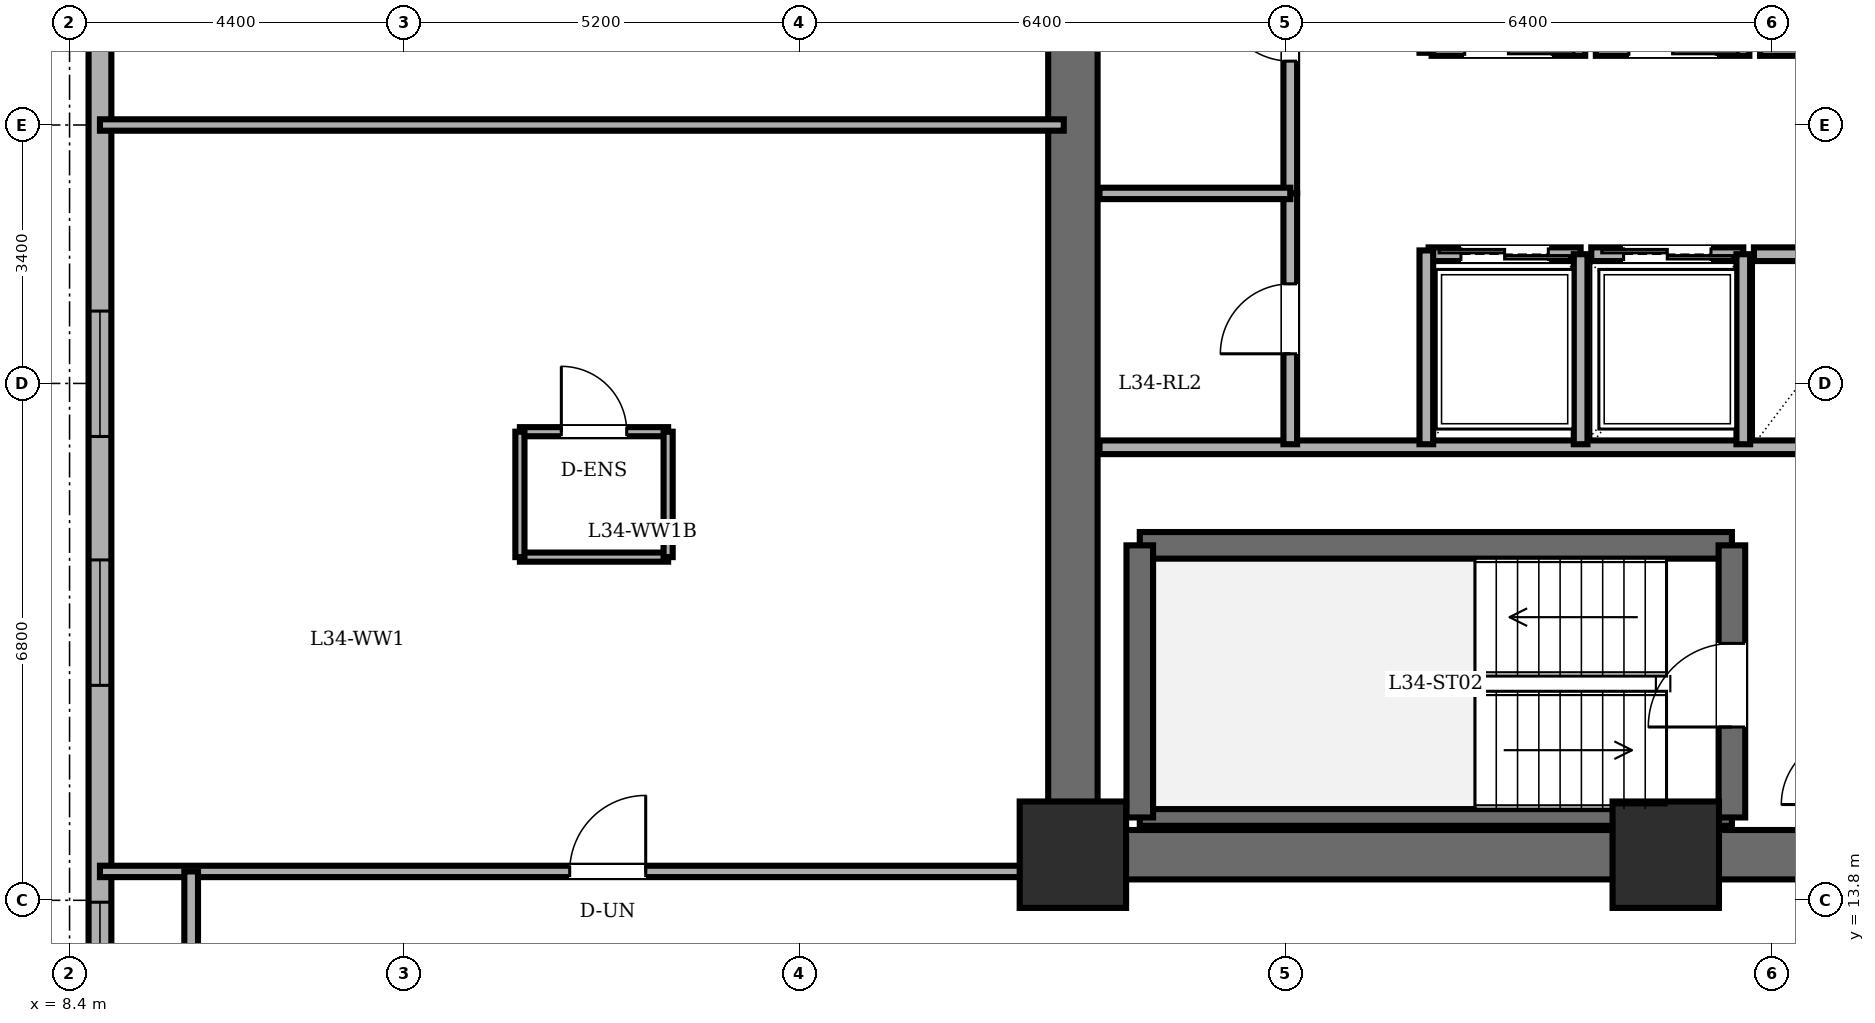
"""IFC4 building model, lengths in metres.
Left out: names, types, materials, properties, quantities, classifications, styles, units other than length and angle.
Written with IfcOpenShell. Run it as: python <this file> out.ifc"""

import sys

from ifc_helpers import new_model, si_unit, direction, frame, frame_2d, origin, origin_2d, place, context, subcontext, project, spatial, rectangle, extrude, element, fill, save


model = new_model("IFC4")
c1 = context("Model", 3, precision=1e-05, world=origin(), true_north=direction((0.0, 1.0)))
c2 = subcontext(c1, "Body", "Model", "MODEL_VIEW")
j1 = project(units=[si_unit("LENGTHUNIT", "METRE"), si_unit("PLANEANGLEUNIT", "RADIAN")], contexts=[c1])
p1 = place(None, origin())
s1 = spatial("IfcSite", under=j1, at=p1, CompositionType="ELEMENT")
p2 = place(p1, origin())
s2 = spatial("IfcBuilding", under=s1, at=p2, CompositionType="ELEMENT")
p3 = place(p2, frame((0.0, 0.0, 129.5)))
s3 = spatial("IfcBuildingStorey", under=s2, at=p3, CompositionType="ELEMENT", Elevation=129.5)
for number, where, z_axis, x_axis in (
    (1, (21.6, 14.4, 0.0), (0.0, 0.0, 1.0), (1.0, 0.0, 0.0)),
    (2, (29.4, 14.4, 0.0), (0.0, 0.0, 1.0), (1.0, 0.0, 0.0)),
):
    element("IfcColumn", number, at=place(p3, frame(where, z_axis=z_axis, x_axis=x_axis)), inside=s3, PredefinedType="COLUMN", context=c2, shape_type="SweptSolid", body=[
        extrude(rectangle(XDim=1.4, YDim=1.4, at=origin_2d()), origin(), (0.0, 0.0, 1.0), 3.6),
    ])
p4 = place(p3, frame((8.8, 38.2, 0.0), z_axis=(0.0, 0.0, 1.0), x_axis=(0.0, -1.0, 0.0)))
e3 = element("IfcWall", 3, at=p4, inside=s3, PredefinedType="SOLIDWALL", context=c2, shape_type="SweptSolid", body=[
    extrude(rectangle(XDim=28.4, YDim=0.3, at=frame_2d((14.2, 0.0))), origin(), (0.0, 0.0, 1.0), 3.36),
])
p5 = place(p4, frame((2.325, 0.0, 0.85)))
e4 = element("IfcOpeningElement", 4, at=p5, cuts=e3, PredefinedType="OPENING", context=c2, shape_type="SweptSolid", body=[
    extrude(rectangle(XDim=1.65, YDim=1.55, at=frame_2d((0.825, 0.775))), frame((0.0, 0.16, 0.0), z_axis=(0.0, -1.0, 0.0), x_axis=(1.0, 0.0, 0.0)), (0.0, 0.0, 1.0), 0.32),
])
p6 = place(p4, frame((6.828, 0.0, 0.85)))
e5 = element("IfcOpeningElement", 5, at=p6, cuts=e3, PredefinedType="OPENING", context=c2, shape_type="SweptSolid", body=[
    extrude(rectangle(XDim=1.65, YDim=1.55, at=frame_2d((0.825, 0.775))), frame((0.0, 0.16, 0.0), z_axis=(0.0, -1.0, 0.0), x_axis=(1.0, 0.0, 0.0)), (0.0, 0.0, 1.0), 0.32),
])
p7 = place(p4, frame((10.102, 0.0, 0.85)))
e6 = element("IfcOpeningElement", 6, at=p7, cuts=e3, PredefinedType="OPENING", context=c2, shape_type="SweptSolid", body=[
    extrude(rectangle(XDim=1.65, YDim=1.55, at=frame_2d((0.825, 0.775))), frame((0.0, 0.16, 0.0), z_axis=(0.0, -1.0, 0.0), x_axis=(1.0, 0.0, 0.0)), (0.0, 0.0, 1.0), 0.32),
])
p8 = place(p4, frame((16.648, 0.0, 0.85)))
e7 = element("IfcOpeningElement", 7, at=p8, cuts=e3, PredefinedType="OPENING", context=c2, shape_type="SweptSolid", body=[
    extrude(rectangle(XDim=1.65, YDim=1.55, at=frame_2d((0.825, 0.775))), frame((0.0, 0.16, 0.0), z_axis=(0.0, -1.0, 0.0), x_axis=(1.0, 0.0, 0.0)), (0.0, 0.0, 1.0), 0.32),
])
p9 = place(p4, frame((19.922, 0.0, 0.85)))
e8 = element("IfcOpeningElement", 8, at=p9, cuts=e3, PredefinedType="OPENING", context=c2, shape_type="SweptSolid", body=[
    extrude(rectangle(XDim=1.65, YDim=1.55, at=frame_2d((0.825, 0.775))), frame((0.0, 0.16, 0.0), z_axis=(0.0, -1.0, 0.0), x_axis=(1.0, 0.0, 0.0)), (0.0, 0.0, 1.0), 0.32),
])
p10 = place(p4, frame((24.425, 0.0, 0.85)))
e9 = element("IfcOpeningElement", 9, at=p10, cuts=e3, PredefinedType="OPENING", context=c2, shape_type="SweptSolid", body=[
    extrude(rectangle(XDim=1.65, YDim=1.55, at=frame_2d((0.825, 0.775))), frame((0.0, 0.16, 0.0), z_axis=(0.0, -1.0, 0.0), x_axis=(1.0, 0.0, 0.0)), (0.0, 0.0, 1.0), 0.32),
])
p11 = place(p3, frame((21.6, 14.4, 0.0), z_axis=(0.0, 0.0, 1.0), x_axis=(0.0, 1.0, 0.0)))
e10 = element("IfcWall", 10, at=p11, inside=s3, PredefinedType="SHEAR", context=c2, shape_type="SweptSolid", body=[
    extrude(rectangle(XDim=19.2, YDim=0.65, at=frame_2d((9.6, 0.0))), origin(), (0.0, 0.0, 1.0), 3.36),
])
p12 = place(p3, frame((37.2, 14.4, 0.0), z_axis=(0.0, 0.0, 1.0), x_axis=(-1.0, 0.0, 0.0)))
e11 = element("IfcWall", 11, at=p12, inside=s3, PredefinedType="SHEAR", context=c2, shape_type="SweptSolid", body=[
    extrude(rectangle(XDim=15.6, YDim=0.65, at=frame_2d((7.8, 0.0))), origin(), (0.0, 0.0, 1.0), 3.36),
])
p13 = place(p3, frame((22.48, 18.47, 0.0), z_axis=(0.0, 0.0, 1.0), x_axis=(1.0, 0.0, 0.0)))
e12 = element("IfcWall", 12, at=p13, inside=s3, PredefinedType="SOLIDWALL", context=c2, shape_type="SweptSolid", body=[
    extrude(rectangle(XDim=7.79, YDim=0.35, at=frame_2d((3.895, 0.0))), origin(), (0.0, 0.0, 1.0), 3.36),
])
p14 = place(p3, frame((22.48, 14.89, 0.0), z_axis=(0.0, 0.0, 1.0), x_axis=(1.0, 0.0, 0.0)))
e13 = element("IfcWall", 13, at=p14, inside=s3, PredefinedType="PARTITIONING", context=c2, shape_type="SweptSolid", body=[
    extrude(rectangle(XDim=7.79, YDim=0.22, at=frame_2d((3.895, 0.0))), origin(), (0.0, 0.0, 1.0), 3.36),
])
p15 = place(p3, frame((22.48, 14.89, 0.0), z_axis=(0.0, 0.0, 1.0), x_axis=(0.0, 1.0, 0.0)))
e14 = element("IfcWall", 14, at=p15, inside=s3, PredefinedType="SOLIDWALL", context=c2, shape_type="SweptSolid", body=[
    extrude(rectangle(XDim=3.58, YDim=0.35, at=frame_2d((1.79, 0.0))), origin(), (0.0, 0.0, 1.0), 3.36),
])
p16 = place(p3, frame((30.27, 14.89, 0.0), z_axis=(0.0, 0.0, 1.0), x_axis=(0.0, 1.0, 0.0)))
e15 = element("IfcWall", 15, at=p16, inside=s3, PredefinedType="SOLIDWALL", context=c2, shape_type="SweptSolid", body=[
    extrude(rectangle(XDim=3.58, YDim=0.35, at=frame_2d((1.79, 0.0))), origin(), (0.0, 0.0, 1.0), 3.36),
])
p17 = place(p16, frame((1.19, 0.0, 0.0)))
e16 = element("IfcOpeningElement", 16, at=p17, cuts=e15, PredefinedType="OPENING", context=c2, shape_type="SweptSolid", body=[
    extrude(rectangle(XDim=1.1, YDim=2.15, at=frame_2d((0.55, 1.075))), frame((0.0, 0.185, 0.0), z_axis=(0.0, -1.0, 0.0), x_axis=(1.0, 0.0, 0.0)), (0.0, 0.0, 1.0), 0.37),
])
p18 = place(p3, frame((21.95, 19.76, 0.0), z_axis=(0.0, 0.0, 1.0), x_axis=(1.0, 0.0, 0.0)))
e17 = element("IfcWall", 17, at=p18, inside=s3, PredefinedType="PARTITIONING", context=c2, shape_type="SweptSolid", body=[
    extrude(rectangle(XDim=14.87, YDim=0.18, at=frame_2d((7.435, 0.0))), origin(), (0.0, 0.0, 1.0), 3.36),
])
p19 = place(p3, frame((28.34, 25.0, 0.0), z_axis=(0.0, 0.0, 1.0), x_axis=(-1.0, 0.0, 0.0)))
e18 = element("IfcWall", 18, at=p19, inside=s3, PredefinedType="PARTITIONING", context=c2, shape_type="SweptSolid", body=[
    extrude(rectangle(XDim=2.02, YDim=0.18, at=frame_2d((1.01, 0.0))), origin(), (0.0, 0.0, 1.0), 3.36),
])
p20 = place(p19, frame((0.435, 0.0, 0.0)))
e19 = element("IfcOpeningElement", 19, at=p20, cuts=e18, PredefinedType="OPENING", context=c2, shape_type="SweptSolid", body=[
    extrude(rectangle(XDim=1.15, YDim=2.2, at=frame_2d((0.575, 1.1))), frame((0.0, 0.1, 0.0), z_axis=(0.0, -1.0, 0.0), x_axis=(1.0, 0.0, 0.0)), (0.0, 0.0, 1.0), 0.2),
])
p21 = place(p3, frame((30.5, 25.0, 0.0), z_axis=(0.0, 0.0, 1.0), x_axis=(-1.0, 0.0, 0.0)))
e20 = element("IfcWall", 20, at=p21, inside=s3, PredefinedType="PARTITIONING", context=c2, shape_type="SweptSolid", body=[
    extrude(rectangle(XDim=2.02, YDim=0.18, at=frame_2d((1.01, 0.0))), origin(), (0.0, 0.0, 1.0), 3.36),
])
p22 = place(p21, frame((0.435, 0.0, 0.0)))
e21 = element("IfcOpeningElement", 21, at=p22, cuts=e20, PredefinedType="OPENING", context=c2, shape_type="SweptSolid", body=[
    extrude(rectangle(XDim=1.15, YDim=2.2, at=frame_2d((0.575, 1.1))), frame((0.0, 0.1, 0.0), z_axis=(0.0, -1.0, 0.0), x_axis=(1.0, 0.0, 0.0)), (0.0, 0.0, 1.0), 0.2),
])
p23 = place(p3, frame((26.28, 22.3, 0.0), z_axis=(0.0, 0.0, 1.0), x_axis=(1.0, 0.0, 0.0)))
e22 = element("IfcWall", 22, at=p23, inside=s3, PredefinedType="PARTITIONING", context=c2, shape_type="SweptSolid", body=[
    extrude(rectangle(XDim=2.0, YDim=0.18, at=frame_2d((1.0, 0.0))), origin(), (0.0, 0.0, 1.0), 3.36),
])
p24 = place(p23, frame((0.425, 0.0, 0.0)))
e23 = element("IfcOpeningElement", 23, at=p24, cuts=e22, PredefinedType="OPENING", context=c2, shape_type="SweptSolid", body=[
    extrude(rectangle(XDim=1.15, YDim=2.2, at=frame_2d((0.575, 1.1))), frame((0.0, 0.1, 0.0), z_axis=(0.0, -1.0, 0.0), x_axis=(1.0, 0.0, 0.0)), (0.0, 0.0, 1.0), 0.2),
])
p25 = place(p3, frame((28.28, 19.8, 0.0), z_axis=(0.0, 0.0, 1.0), x_axis=(0.0, 1.0, 0.0)))
e24 = element("IfcWall", 24, at=p25, inside=s3, PredefinedType="PARTITIONING", context=c2, shape_type="SweptSolid", body=[
    extrude(rectangle(XDim=2.5, YDim=0.18, at=frame_2d((1.25, 0.0))), origin(), (0.0, 0.0, 1.0), 3.36),
])
p26 = place(p3, frame((28.42, 22.3, 0.0), z_axis=(0.0, 0.0, 1.0), x_axis=(1.0, 0.0, 0.0)))
e25 = element("IfcWall", 25, at=p26, inside=s3, PredefinedType="PARTITIONING", context=c2, shape_type="SweptSolid", body=[
    extrude(rectangle(XDim=2.0, YDim=0.18, at=frame_2d((1.0, 0.0))), origin(), (0.0, 0.0, 1.0), 3.36),
])
p27 = place(p26, frame((0.425, 0.0, 0.0)))
e26 = element("IfcOpeningElement", 26, at=p27, cuts=e25, PredefinedType="OPENING", context=c2, shape_type="SweptSolid", body=[
    extrude(rectangle(XDim=1.15, YDim=2.2, at=frame_2d((0.575, 1.1))), frame((0.0, 0.1, 0.0), z_axis=(0.0, -1.0, 0.0), x_axis=(1.0, 0.0, 0.0)), (0.0, 0.0, 1.0), 0.2),
])
p28 = place(p3, frame((30.42, 19.8, 0.0), z_axis=(0.0, 0.0, 1.0), x_axis=(0.0, 1.0, 0.0)))
e27 = element("IfcWall", 27, at=p28, inside=s3, PredefinedType="PARTITIONING", context=c2, shape_type="SweptSolid", body=[
    extrude(rectangle(XDim=2.5, YDim=0.18, at=frame_2d((1.25, 0.0))), origin(), (0.0, 0.0, 1.0), 3.36),
])
p29 = place(p3, frame((32.46, 25.0, 0.0), z_axis=(0.0, 0.0, 1.0), x_axis=(-1.0, 0.0, 0.0)))
e28 = element("IfcWall", 28, at=p29, inside=s3, PredefinedType="PARTITIONING", context=c2, shape_type="SweptSolid", body=[
    extrude(rectangle(XDim=1.82, YDim=0.18, at=frame_2d((0.91, 0.0))), origin(), (0.0, 0.0, 1.0), 3.36),
])
p30 = place(p3, frame((30.56, 22.3, 0.0), z_axis=(0.0, 0.0, 1.0), x_axis=(1.0, 0.0, 0.0)))
e29 = element("IfcWall", 29, at=p30, inside=s3, PredefinedType="PARTITIONING", context=c2, shape_type="SweptSolid", body=[
    extrude(rectangle(XDim=1.9, YDim=0.18, at=frame_2d((0.95, 0.0))), origin(), (0.0, 0.0, 1.0), 3.36),
])
p31 = place(p3, frame((24.46, 23.1, 0.0), z_axis=(0.0, 0.0, 1.0), x_axis=(0.0, 1.0, 0.0)))
e30 = element("IfcWall", 30, at=p31, inside=s3, PredefinedType="PARTITIONING", context=c2, shape_type="SweptSolid", body=[
    extrude(rectangle(XDim=4.4, YDim=0.18, at=frame_2d((2.2, 0.0))), origin(), (0.0, 0.0, 1.0), 3.36),
])
p32 = place(p31, frame((1.74, 0.0, 0.0)))
e31 = element("IfcOpeningElement", 31, at=p32, cuts=e30, PredefinedType="OPENING", context=c2, shape_type="SweptSolid", body=[
    extrude(rectangle(XDim=0.92, YDim=2.1, at=frame_2d((0.46, 1.05))), frame((0.0, 0.1, 0.0), z_axis=(0.0, -1.0, 0.0), x_axis=(1.0, 0.0, 0.0)), (0.0, 0.0, 1.0), 0.2),
])
p33 = place(p3, frame((24.46, 19.8, 0.0), z_axis=(0.0, 0.0, 1.0), x_axis=(0.0, 1.0, 0.0)))
e32 = element("IfcWall", 32, at=p33, inside=s3, PredefinedType="PARTITIONING", context=c2, shape_type="SweptSolid", body=[
    extrude(rectangle(XDim=3.3, YDim=0.18, at=frame_2d((1.65, 0.0))), origin(), (0.0, 0.0, 1.0), 3.36),
])
p34 = place(p33, frame((1.19, 0.0, 0.0)))
e33 = element("IfcOpeningElement", 33, at=p34, cuts=e32, PredefinedType="OPENING", context=c2, shape_type="SweptSolid", body=[
    extrude(rectangle(XDim=0.92, YDim=2.1, at=frame_2d((0.46, 1.05))), frame((0.0, 0.1, 0.0), z_axis=(0.0, -1.0, 0.0), x_axis=(1.0, 0.0, 0.0)), (0.0, 0.0, 1.0), 0.2),
])
p35 = place(p3, frame((21.95, 23.1, 0.0), z_axis=(0.0, 0.0, 1.0), x_axis=(1.0, 0.0, 0.0)))
e34 = element("IfcWall", 34, at=p35, inside=s3, PredefinedType="PARTITIONING", context=c2, shape_type="SweptSolid", body=[
    extrude(rectangle(XDim=2.51, YDim=0.15, at=frame_2d((1.255, 0.0))), origin(), (0.0, 0.0, 1.0), 3.36),
])
for number, where, z_axis, x_axis in (
    (35, (26.25, 24.95, 0.0), (0.0, 0.0, 1.0), (0.0, 1.0, 0.0)),
    (36, (26.25, 19.8, 0.0), (0.0, 0.0, 1.0), (0.0, 1.0, 0.0)),
):
    element("IfcWall", number, at=place(p3, frame(where, z_axis=z_axis, x_axis=x_axis)), inside=s3, PredefinedType="PARTITIONING", context=c2, shape_type="SweptSolid", body=[
        extrude(rectangle(XDim=2.55, YDim=0.18, at=frame_2d((1.275, 0.0))), origin(), (0.0, 0.0, 1.0), 3.36),
    ])
p36 = place(p3, frame((14.325, 19.965, 0.0), z_axis=(0.0, 0.0, 1.0), x_axis=(1.0, 0.0, 0.0)))
e37 = element("IfcWall", 37, at=p36, inside=s3, PredefinedType="PARTITIONING", context=c2, shape_type="SweptSolid", body=[
    extrude(rectangle(XDim=1.95, YDim=0.12, at=frame_2d((0.975, 0.0))), origin(), (0.0, 0.0, 1.0), 3.36),
])
p37 = place(p36, frame((0.545, 0.0, 0.0)))
e38 = element("IfcOpeningElement", 38, at=p37, cuts=e37, PredefinedType="OPENING", context=c2, shape_type="SweptSolid", body=[
    extrude(rectangle(XDim=0.86, YDim=2.1, at=frame_2d((0.43, 1.05))), frame((0.0, 0.07, 0.0), z_axis=(0.0, -1.0, 0.0), x_axis=(1.0, 0.0, 0.0)), (0.0, 0.0, 1.0), 0.14),
])
p38 = place(p3, frame((16.275, 18.315, 0.0), z_axis=(0.0, 0.0, 1.0), x_axis=(-1.0, 0.0, 0.0)))
e39 = element("IfcWall", 39, at=p38, inside=s3, PredefinedType="PARTITIONING", context=c2, shape_type="SweptSolid", body=[
    extrude(rectangle(XDim=1.95, YDim=0.12, at=frame_2d((0.975, 0.0))), origin(), (0.0, 0.0, 1.0), 3.36),
])
for number, where, z_axis, x_axis in (
    (40, (14.325, 19.965, 0.0), (0.0, 0.0, 1.0), (0.0, -1.0, 0.0)),
    (41, (16.275, 18.315, 0.0), (0.0, 0.0, 1.0), (0.0, 1.0, 0.0)),
):
    element("IfcWall", number, at=place(p3, frame(where, z_axis=z_axis, x_axis=x_axis)), inside=s3, PredefinedType="PARTITIONING", context=c2, shape_type="SweptSolid", body=[
        extrude(rectangle(XDim=1.65, YDim=0.12, at=frame_2d((0.825, 0.0))), origin(), (0.0, 0.0, 1.0), 3.36),
    ])
p39 = place(p3, frame((8.8, 14.18, 0.0), z_axis=(0.0, 0.0, 1.0), x_axis=(1.0, 0.0, 0.0)))
e42 = element("IfcWall", 42, at=p39, inside=s3, PredefinedType="PARTITIONING", context=c2, shape_type="SweptSolid", body=[
    extrude(rectangle(XDim=12.68, YDim=0.15, at=frame_2d((6.34, 0.0))), origin(), (0.0, 0.0, 1.0), 3.36),
])
p40 = place(p39, frame((6.18, 0.0, 0.0)))
e43 = element("IfcOpeningElement", 43, at=p40, cuts=e42, PredefinedType="OPENING", context=c2, shape_type="SweptSolid", body=[
    extrude(rectangle(XDim=1.0, YDim=2.15, at=frame_2d((0.5, 1.075))), frame((0.0, 0.085, 0.0), z_axis=(0.0, -1.0, 0.0), x_axis=(1.0, 0.0, 0.0)), (0.0, 0.0, 1.0), 0.17),
])
p41 = place(p3, frame((8.8, 24.0, 0.0), z_axis=(0.0, 0.0, 1.0), x_axis=(1.0, 0.0, 0.0)))
e44 = element("IfcWall", 44, at=p41, inside=s3, PredefinedType="PARTITIONING", context=c2, shape_type="SweptSolid", body=[
    extrude(rectangle(XDim=12.68, YDim=0.15, at=frame_2d((6.34, 0.0))), origin(), (0.0, 0.0, 1.0), 3.36),
])
p42 = place(p3, frame((10.0, 11.72, 0.0), z_axis=(0.0, 0.0, 1.0), x_axis=(0.0, 1.0, 0.0)))
e45 = element("IfcWall", 45, at=p42, inside=s3, PredefinedType="PARTITIONING", context=c2, shape_type="SweptSolid", body=[
    extrude(rectangle(XDim=2.46, YDim=0.18, at=frame_2d((1.23, 0.0))), origin(), (0.0, 0.0, 1.0), 3.36),
])
p43 = place(p8, origin())
e46 = element("IfcWindow", 46, at=p43, inside=s3, PartitioningType="DOUBLE_PANEL_VERTICAL", PredefinedType="WINDOW", context=c2, shape_type="SweptSolid", body=[
    extrude(rectangle(XDim=1.65, YDim=1.55, at=frame_2d((0.825, 0.775))), frame((0.0, 0.03, 0.0), z_axis=(0.0, -1.0, 0.0), x_axis=(1.0, 0.0, 0.0)), (0.0, 0.0, 1.0), 0.06),
])
fill(e7, e46)
p44 = place(p9, origin())
e47 = element("IfcWindow", 47, at=p44, inside=s3, PartitioningType="DOUBLE_PANEL_VERTICAL", PredefinedType="WINDOW", context=c2, shape_type="SweptSolid", body=[
    extrude(rectangle(XDim=1.65, YDim=1.55, at=frame_2d((0.825, 0.775))), frame((0.0, 0.03, 0.0), z_axis=(0.0, -1.0, 0.0), x_axis=(1.0, 0.0, 0.0)), (0.0, 0.0, 1.0), 0.06),
])
fill(e8, e47)
p45 = place(p10, origin())
e48 = element("IfcWindow", 48, at=p45, inside=s3, PartitioningType="DOUBLE_PANEL_VERTICAL", PredefinedType="WINDOW", context=c2, shape_type="SweptSolid", body=[
    extrude(rectangle(XDim=1.65, YDim=1.55, at=frame_2d((0.825, 0.775))), frame((0.0, 0.03, 0.0), z_axis=(0.0, -1.0, 0.0), x_axis=(1.0, 0.0, 0.0)), (0.0, 0.0, 1.0), 0.06),
])
fill(e9, e48)
p46 = place(p17, origin())
e49 = element("IfcDoor", 49, at=p46, inside=s3, OperationType="SINGLE_SWING_LEFT", PredefinedType="DOOR", context=c2, shape_type="SweptSolid", body=[
    extrude(rectangle(XDim=1.1, YDim=2.15, at=frame_2d((0.55, 1.075))), frame((0.0, 0.025, 0.0), z_axis=(0.0, -1.0, 0.0), x_axis=(1.0, 0.0, 0.0)), (0.0, 0.0, 1.0), 0.05),
])
fill(e16, e49)
p47 = place(p24, origin())
e50 = element("IfcDoor", 50, at=p47, inside=s3, OperationType="DOUBLE_DOOR_SLIDING", PredefinedType="DOOR", context=c2, shape_type="SweptSolid", body=[
    extrude(rectangle(XDim=1.15, YDim=2.2, at=frame_2d((0.575, 1.1))), frame((0.0, 0.025, 0.0), z_axis=(0.0, -1.0, 0.0), x_axis=(1.0, 0.0, 0.0)), (0.0, 0.0, 1.0), 0.05),
])
fill(e23, e50)
p48 = place(p27, origin())
e51 = element("IfcDoor", 51, at=p48, inside=s3, OperationType="DOUBLE_DOOR_SLIDING", PredefinedType="DOOR", context=c2, shape_type="SweptSolid", body=[
    extrude(rectangle(XDim=1.15, YDim=2.2, at=frame_2d((0.575, 1.1))), frame((0.0, 0.025, 0.0), z_axis=(0.0, -1.0, 0.0), x_axis=(1.0, 0.0, 0.0)), (0.0, 0.0, 1.0), 0.05),
])
fill(e26, e51)
p49 = place(p32, origin())
e52 = element("IfcDoor", 52, at=p49, inside=s3, OperationType="SINGLE_SWING_RIGHT", PredefinedType="DOOR", context=c2, shape_type="SweptSolid", body=[
    extrude(rectangle(XDim=0.92, YDim=2.1, at=frame_2d((0.46, 1.05))), frame((0.0, 0.025, 0.0), z_axis=(0.0, -1.0, 0.0), x_axis=(1.0, 0.0, 0.0)), (0.0, 0.0, 1.0), 0.05),
])
fill(e31, e52)
p50 = place(p34, origin())
e53 = element("IfcDoor", 53, at=p50, inside=s3, OperationType="SINGLE_SWING_LEFT", PredefinedType="DOOR", context=c2, shape_type="SweptSolid", body=[
    extrude(rectangle(XDim=0.92, YDim=2.1, at=frame_2d((0.46, 1.05))), frame((0.0, 0.025, 0.0), z_axis=(0.0, -1.0, 0.0), x_axis=(1.0, 0.0, 0.0)), (0.0, 0.0, 1.0), 0.05),
])
fill(e33, e53)
p51 = place(p37, origin())
e54 = element("IfcDoor", 54, at=p51, inside=s3, OperationType="SINGLE_SWING_LEFT", PredefinedType="DOOR", context=c2, shape_type="SweptSolid", body=[
    extrude(rectangle(XDim=0.86, YDim=2.1, at=frame_2d((0.43, 1.05))), frame((0.0, 0.025, 0.0), z_axis=(0.0, -1.0, 0.0), x_axis=(1.0, 0.0, 0.0)), (0.0, 0.0, 1.0), 0.05),
])
fill(e38, e54)
p52 = place(p40, origin())
e55 = element("IfcDoor", 55, at=p52, inside=s3, OperationType="SINGLE_SWING_RIGHT", PredefinedType="DOOR", context=c2, shape_type="SweptSolid", body=[
    extrude(rectangle(XDim=1.0, YDim=2.15, at=frame_2d((0.5, 1.075))), frame((0.0, 0.025, 0.0), z_axis=(0.0, -1.0, 0.0), x_axis=(1.0, 0.0, 0.0)), (0.0, 0.0, 1.0), 0.05),
])
fill(e43, e55)
save(model, sys.argv[1])
